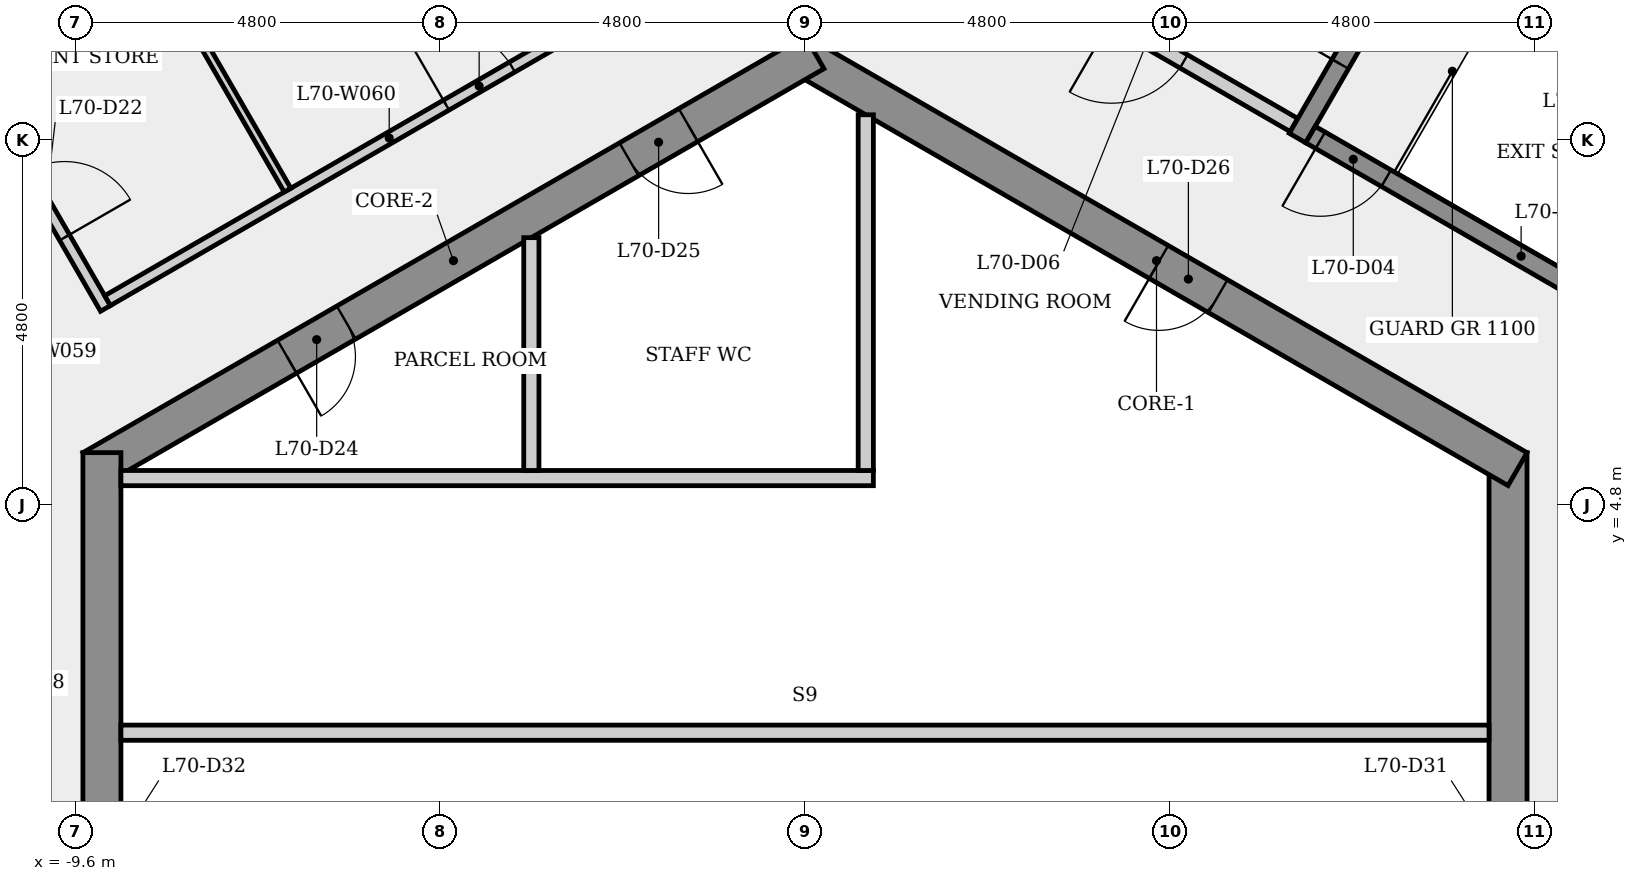
"""IFC4 building model, lengths in metres.
Left out: names, types, materials, properties, quantities, classifications, styles, units other than length and angle.
Written with IfcOpenShell. Run it as: python <this file> out.ifc"""

import sys

from ifc_helpers import new_model, si_unit, direction, frame, frame_2d, origin, place, context, subcontext, project, spatial, rectangle, extrude, element, fill, save


model = new_model("IFC4")
c1 = context("Model", 3, precision=1e-05, world=origin(), true_north=direction((0.0, 1.0)))
c2 = subcontext(c1, "Body", "Model", "MODEL_VIEW")
j1 = project(units=[si_unit("LENGTHUNIT", "METRE"), si_unit("PLANEANGLEUNIT", "RADIAN")], contexts=[c1])
p1 = place(None, origin())
s1 = spatial("IfcSite", under=j1, at=p1, CompositionType="ELEMENT")
p2 = place(p1, origin())
s2 = spatial("IfcBuilding", under=s1, at=p2, CompositionType="ELEMENT")
p3 = place(p2, frame((0.0, 0.0, 262.9)))
s3 = spatial("IfcBuildingStorey", under=s2, at=p3, CompositionType="ELEMENT", Elevation=262.9)
p4 = place(p3, frame((9.25, -5.485, 0.0), z_axis=(0.0, 0.0, 1.0), x_axis=(0.0, 1.0, 0.0)))
e1 = element("IfcWall", 1, at=p4, inside=s3, PredefinedType="SHEAR", context=c2, shape_type="SweptSolid", body=[
    extrude(rectangle(XDim=10.97, YDim=0.5, at=frame_2d((5.485, 0.0))), origin(), (0.0, 0.0, 1.0), 4.8),
])
p5 = place(p4, frame((4.685, 0.0, 0.0)))
e2 = element("IfcOpeningElement", 2, at=p5, cuts=e1, PredefinedType="OPENING", context=c2, shape_type="SweptSolid", body=[
    extrude(rectangle(XDim=1.6, YDim=2.1, at=frame_2d((0.8, 1.05))), frame((0.0, 0.26, 0.0), z_axis=(0.0, -1.0, 0.0), x_axis=(1.0, 0.0, 0.0)), (0.0, 0.0, 1.0), 0.52),
])
p6 = place(p3, frame((9.375, 5.268, 0.0), z_axis=(0.0, 0.0, 1.0), x_axis=(-0.866023993627, 0.500002442456, 0.0)))
e3 = element("IfcWall", 3, at=p6, inside=s3, PredefinedType="SHEAR", context=c2, shape_type="SweptSolid", body=[
    extrude(rectangle(XDim=10.97, YDim=0.5, at=frame_2d((5.485, 0.0))), origin(), (0.0, 0.0, 1.0), 4.8),
])
p7 = place(p6, frame((4.55, 0.0, 0.0)))
e4 = element("IfcOpeningElement", 4, at=p7, cuts=e3, PredefinedType="OPENING", context=c2, shape_type="SweptSolid", body=[
    extrude(rectangle(XDim=0.9, YDim=2.1, at=frame_2d((0.45, 1.05))), frame((0.0, 0.26, 0.0), z_axis=(0.0, -1.0, 0.0), x_axis=(1.0, 0.0, 0.0)), (0.0, 0.0, 1.0), 0.52),
])
p8 = place(p3, frame((0.125, 10.753, 0.0), z_axis=(0.0, 0.0, 1.0), x_axis=(-0.866023993627, -0.500002442456, 0.0)))
e5 = element("IfcWall", 5, at=p8, inside=s3, PredefinedType="SHEAR", context=c2, shape_type="SweptSolid", body=[
    extrude(rectangle(XDim=10.97, YDim=0.5, at=frame_2d((5.485, 0.0))), origin(), (0.0, 0.0, 1.0), 4.8),
])
p9 = place(p8, frame((7.113, 0.0, 0.0)))
e6 = element("IfcOpeningElement", 6, at=p9, cuts=e5, PredefinedType="OPENING", context=c2, shape_type="SweptSolid", body=[
    extrude(rectangle(XDim=0.9, YDim=2.1, at=frame_2d((0.45, 1.05))), frame((0.0, 0.26, 0.0), z_axis=(0.0, -1.0, 0.0), x_axis=(1.0, 0.0, 0.0)), (0.0, 0.0, 1.0), 0.52),
])
p10 = place(p8, frame((1.918, 0.0, 0.0)))
e7 = element("IfcOpeningElement", 7, at=p10, cuts=e5, PredefinedType="OPENING", context=c2, shape_type="SweptSolid", body=[
    extrude(rectangle(XDim=0.9, YDim=2.1, at=frame_2d((0.45, 1.05))), frame((0.0, 0.26, 0.0), z_axis=(0.0, -1.0, 0.0), x_axis=(1.0, 0.0, 0.0)), (0.0, 0.0, 1.0), 0.52),
])
p11 = place(p3, frame((-9.25, 5.485, 0.0), z_axis=(0.0, 0.0, 1.0), x_axis=(0.0, -1.0, 0.0)))
e8 = element("IfcWall", 8, at=p11, inside=s3, PredefinedType="SHEAR", context=c2, shape_type="SweptSolid", body=[
    extrude(rectangle(XDim=10.97, YDim=0.5, at=frame_2d((5.485, 0.0))), origin(), (0.0, 0.0, 1.0), 4.8),
])
p12 = place(p11, frame((8.509, 0.0, 0.0)))
e9 = element("IfcOpeningElement", 9, at=p12, cuts=e8, PredefinedType="OPENING", context=c2, shape_type="SweptSolid", body=[
    extrude(rectangle(XDim=0.9, YDim=2.1, at=frame_2d((0.45, 1.05))), frame((0.0, 0.26, 0.0), z_axis=(0.0, -1.0, 0.0), x_axis=(1.0, 0.0, 0.0)), (0.0, 0.0, 1.0), 0.52),
])
p13 = place(p11, frame((4.685, 0.0, 0.0)))
e10 = element("IfcOpeningElement", 10, at=p13, cuts=e8, PredefinedType="OPENING", context=c2, shape_type="SweptSolid", body=[
    extrude(rectangle(XDim=1.6, YDim=2.1, at=frame_2d((0.8, 1.05))), frame((0.0, 0.26, 0.0), z_axis=(0.0, -1.0, 0.0), x_axis=(1.0, 0.0, 0.0)), (0.0, 0.0, 1.0), 0.52),
])
p14 = place(p3, frame((-10.742, 10.049, 0.0), z_axis=(0.0, 0.0, 1.0), x_axis=(0.49998558977, -0.866033723375, 0.0)))
e11 = element("IfcWall", 11, at=p14, inside=s3, PredefinedType="PARTITIONING", context=c2, shape_type="SweptSolid", body=[
    extrude(rectangle(XDim=3.079, YDim=0.15, at=frame_2d((1.539, 0.0))), origin(), (0.0, 0.0, 1.0), 4.5),
])
p15 = place(p14, frame((1.002, 0.0, 0.0)))
e12 = element("IfcOpeningElement", 12, at=p15, cuts=e11, PredefinedType="OPENING", context=c2, shape_type="SweptSolid", body=[
    extrude(rectangle(XDim=1.0, YDim=2.1, at=frame_2d((0.5, 1.05))), frame((0.0, 0.085, 0.0), z_axis=(0.0, -1.0, 0.0), x_axis=(1.0, 0.0, 0.0)), (0.0, 0.0, 1.0), 0.17),
])
p16 = place(p3, frame((-9.176, 7.485, 0.0), z_axis=(0.0, 0.0, 1.0), x_axis=(0.8660311782, 0.499989998285, 0.0)))
e13 = element("IfcWall", 13, at=p16, inside=s3, PredefinedType="PARTITIONING", context=c2, shape_type="SweptSolid", body=[
    extrude(rectangle(XDim=8.557, YDim=0.15, at=frame_2d((4.279, 0.0))), origin(), (0.0, 0.0, 1.0), 4.5),
])
p17 = place(p16, frame((5.145, 0.0, 0.0)))
e14 = element("IfcOpeningElement", 14, at=p17, cuts=e13, PredefinedType="OPENING", context=c2, shape_type="SweptSolid", body=[
    extrude(rectangle(XDim=1.0, YDim=2.1, at=frame_2d((0.5, 1.05))), frame((0.0, 0.085, 0.0), z_axis=(0.0, -1.0, 0.0), x_axis=(1.0, 0.0, 0.0)), (0.0, 0.0, 1.0), 0.17),
])
p18 = place(p3, frame((-9.0, 1.8, 0.0), z_axis=(0.0, 0.0, 1.0), x_axis=(1.0, 0.0, 0.0)))
e15 = element("IfcWall", 15, at=p18, inside=s3, PredefinedType="PARTITIONING", context=c2, shape_type="SweptSolid", body=[
    extrude(rectangle(XDim=18.0, YDim=0.2, at=frame_2d((9.0, 0.0))), origin(), (0.0, 0.0, 1.0), 4.5),
])
p19 = place(p3, frame((-6.808, 8.939, 0.0), z_axis=(0.0, 0.0, 1.0), x_axis=(-0.49999446594, 0.866028598852, 0.0)))
e16 = element("IfcWall", 16, at=p19, inside=s3, PredefinedType="PARTITIONING", context=c2, shape_type="SweptSolid", body=[
    extrude(rectangle(XDim=6.164, YDim=0.1, at=frame_2d((3.082, 0.0))), origin(), (0.0, 0.0, 1.0), 4.5),
])
p20 = place(p3, frame((-9.0, 5.15, 0.0), z_axis=(0.0, 0.0, 1.0), x_axis=(1.0, 0.0, 0.0)))
e17 = element("IfcWall", 17, at=p20, inside=s3, PredefinedType="PARTITIONING", context=c2, shape_type="SweptSolid", body=[
    extrude(rectangle(XDim=9.9, YDim=0.2, at=frame_2d((4.95, 0.0))), origin(), (0.0, 0.0, 1.0), 4.5),
])
p21 = place(p3, frame((-3.6, 8.314, 0.0), z_axis=(0.0, 0.0, 1.0), x_axis=(0.0, -1.0, 0.0)))
e18 = element("IfcWall", 18, at=p21, inside=s3, PredefinedType="PARTITIONING", context=c2, shape_type="SweptSolid", body=[
    extrude(rectangle(XDim=3.064, YDim=0.2, at=frame_2d((1.532, 0.0))), origin(), (0.0, 0.0, 1.0), 4.5),
])
p22 = place(p3, frame((0.8, 9.93, 0.0), z_axis=(0.0, 0.0, 1.0), x_axis=(0.0, -1.0, 0.0)))
e19 = element("IfcWall", 19, at=p22, inside=s3, PredefinedType="PARTITIONING", context=c2, shape_type="SweptSolid", body=[
    extrude(rectangle(XDim=4.68, YDim=0.2, at=frame_2d((2.34, 0.0))), origin(), (0.0, 0.0, 1.0), 4.5),
])
p23 = place(p3, frame((6.435, 9.795, 0.0), z_axis=(0.0, 0.0, 1.0), x_axis=(-0.866012907634, 0.500021643343, 0.0)))
e20 = element("IfcWall", 20, at=p23, inside=s3, PredefinedType="PARTITIONING", context=c2, shape_type="SweptSolid", body=[
    extrude(rectangle(XDim=4.45, YDim=0.2, at=frame_2d((2.225, 0.0))), origin(), (0.0, 0.0, 1.0), 4.5),
])
p24 = place(p23, frame((1.675, 0.0, 0.0)))
e21 = element("IfcOpeningElement", 21, at=p24, cuts=e20, PredefinedType="OPENING", context=c2, shape_type="SweptSolid", body=[
    extrude(rectangle(XDim=1.1, YDim=2.1, at=frame_2d((0.55, 1.05))), frame((0.0, 0.11, 0.0), z_axis=(0.0, -1.0, 0.0), x_axis=(1.0, 0.0, 0.0)), (0.0, 0.0, 1.0), 0.22),
])
p25 = place(p3, frame((6.48, 9.624, 0.0), z_axis=(0.0, 0.0, 1.0), x_axis=(0.500017246033, 0.866015446554, 0.0)))
e22 = element("IfcWall", 22, at=p25, inside=s3, PredefinedType="SHEAR", context=c2, shape_type="SweptSolid", body=[
    extrude(rectangle(XDim=3.25, YDim=0.25, at=frame_2d((1.625, 0.0))), origin(), (0.0, 0.0, 1.0), 4.5),
])
p26 = place(p25, frame((1.125, 0.0, 0.0)))
e23 = element("IfcOpeningElement", 23, at=p26, cuts=e22, PredefinedType="OPENING", context=c2, shape_type="SweptSolid", body=[
    extrude(rectangle(XDim=1.0, YDim=2.1, at=frame_2d((0.5, 1.05))), frame((0.0, 0.135, 0.0), z_axis=(0.0, -1.0, 0.0), x_axis=(1.0, 0.0, 0.0)), (0.0, 0.0, 1.0), 0.27),
])
p27 = place(p3, frame((8.151, 12.268, 0.0), z_axis=(0.0, 0.0, 1.0), x_axis=(0.866025499775, -0.499999833739, 0.0)))
e24 = element("IfcWall", 24, at=p27, inside=s3, PredefinedType="SHEAR", context=c2, shape_type="SweptSolid", body=[
    extrude(rectangle(XDim=6.4, YDim=0.25, at=frame_2d((3.2, 0.0))), origin(), (0.0, 0.0, 1.0), 4.5),
])
p28 = place(p3, frame((12.194, 6.47, 0.0), z_axis=(0.0, 0.0, 1.0), x_axis=(-0.866025499775, 0.499999833739, 0.0)))
e25 = element("IfcWall", 25, at=p28, inside=s3, PredefinedType="SHEAR", context=c2, shape_type="SweptSolid", body=[
    extrude(rectangle(XDim=6.4, YDim=0.25, at=frame_2d((3.2, 0.0))), origin(), (0.0, 0.0, 1.0), 4.5),
])
p29 = place(p28, frame((5.25, 0.0, 0.0)))
e26 = element("IfcOpeningElement", 26, at=p29, cuts=e25, PredefinedType="OPENING", context=c2, shape_type="SweptSolid", body=[
    extrude(rectangle(XDim=1.0, YDim=2.1, at=frame_2d((0.5, 1.05))), frame((0.0, 0.135, 0.0), z_axis=(0.0, -1.0, 0.0), x_axis=(1.0, 0.0, 0.0)), (0.0, 0.0, 1.0), 0.27),
])
p30 = place(p29, origin())
e27 = element("IfcDoor", 27, at=p30, inside=s3, OperationType="SINGLE_SWING_RIGHT", PredefinedType="DOOR", context=c2, shape_type="SweptSolid", body=[
    extrude(rectangle(XDim=1.0, YDim=2.1, at=frame_2d((0.5, 1.05))), frame((0.0, 0.025, 0.0), z_axis=(0.0, -1.0, 0.0), x_axis=(1.0, 0.0, 0.0)), (0.0, 0.0, 1.0), 0.05),
])
fill(e26, e27)
p31 = place(p26, origin())
e28 = element("IfcDoor", 28, at=p31, inside=s3, OperationType="SINGLE_SWING_LEFT", PredefinedType="DOOR", context=c2, shape_type="SweptSolid", body=[
    extrude(rectangle(XDim=1.0, YDim=2.1, at=frame_2d((0.5, 1.05))), frame((0.0, 0.025, 0.0), z_axis=(0.0, -1.0, 0.0), x_axis=(1.0, 0.0, 0.0)), (0.0, 0.0, 1.0), 0.05),
])
fill(e23, e28)
p32 = place(p24, origin())
e29 = element("IfcDoor", 29, at=p32, inside=s3, OperationType="SINGLE_SWING_RIGHT", PredefinedType="DOOR", context=c2, shape_type="SweptSolid", body=[
    extrude(rectangle(XDim=1.1, YDim=2.1, at=frame_2d((0.55, 1.05))), frame((0.0, 0.025, 0.0), z_axis=(0.0, -1.0, 0.0), x_axis=(1.0, 0.0, 0.0)), (0.0, 0.0, 1.0), 0.05),
])
fill(e21, e29)
p33 = place(p17, origin())
e30 = element("IfcDoor", 30, at=p33, inside=s3, OperationType="SINGLE_SWING_LEFT", PredefinedType="DOOR", context=c2, shape_type="SweptSolid", body=[
    extrude(rectangle(XDim=1.0, YDim=2.1, at=frame_2d((0.5, 1.05))), frame((0.0, 0.025, 0.0), z_axis=(0.0, -1.0, 0.0), x_axis=(1.0, 0.0, 0.0)), (0.0, 0.0, 1.0), 0.05),
])
fill(e14, e30)
p34 = place(p15, origin())
e31 = element("IfcDoor", 31, at=p34, inside=s3, OperationType="SINGLE_SWING_RIGHT", PredefinedType="DOOR", context=c2, shape_type="SweptSolid", body=[
    extrude(rectangle(XDim=1.0, YDim=2.1, at=frame_2d((0.5, 1.05))), frame((0.0, 0.025, 0.0), z_axis=(0.0, -1.0, 0.0), x_axis=(1.0, 0.0, 0.0)), (0.0, 0.0, 1.0), 0.05),
])
fill(e12, e31)
p35 = place(p9, origin())
e32 = element("IfcDoor", 32, at=p35, inside=s3, OperationType="SINGLE_SWING_RIGHT", PredefinedType="DOOR", context=c2, shape_type="SweptSolid", body=[
    extrude(rectangle(XDim=0.9, YDim=2.1, at=frame_2d((0.45, 1.05))), frame((0.0, 0.025, 0.0), z_axis=(0.0, -1.0, 0.0), x_axis=(1.0, 0.0, 0.0)), (0.0, 0.0, 1.0), 0.05),
])
fill(e6, e32)
p36 = place(p10, origin())
e33 = element("IfcDoor", 33, at=p36, inside=s3, OperationType="SINGLE_SWING_LEFT", PredefinedType="DOOR", context=c2, shape_type="SweptSolid", body=[
    extrude(rectangle(XDim=0.9, YDim=2.1, at=frame_2d((0.45, 1.05))), frame((0.0, 0.025, 0.0), z_axis=(0.0, -1.0, 0.0), x_axis=(1.0, 0.0, 0.0)), (0.0, 0.0, 1.0), 0.05),
])
fill(e7, e33)
p37 = place(p7, origin())
e34 = element("IfcDoor", 34, at=p37, inside=s3, OperationType="SINGLE_SWING_RIGHT", PredefinedType="DOOR", context=c2, shape_type="SweptSolid", body=[
    extrude(rectangle(XDim=0.9, YDim=2.1, at=frame_2d((0.45, 1.05))), frame((0.0, 0.025, 0.0), z_axis=(0.0, -1.0, 0.0), x_axis=(1.0, 0.0, 0.0)), (0.0, 0.0, 1.0), 0.05),
])
fill(e4, e34)
save(model, sys.argv[1])
